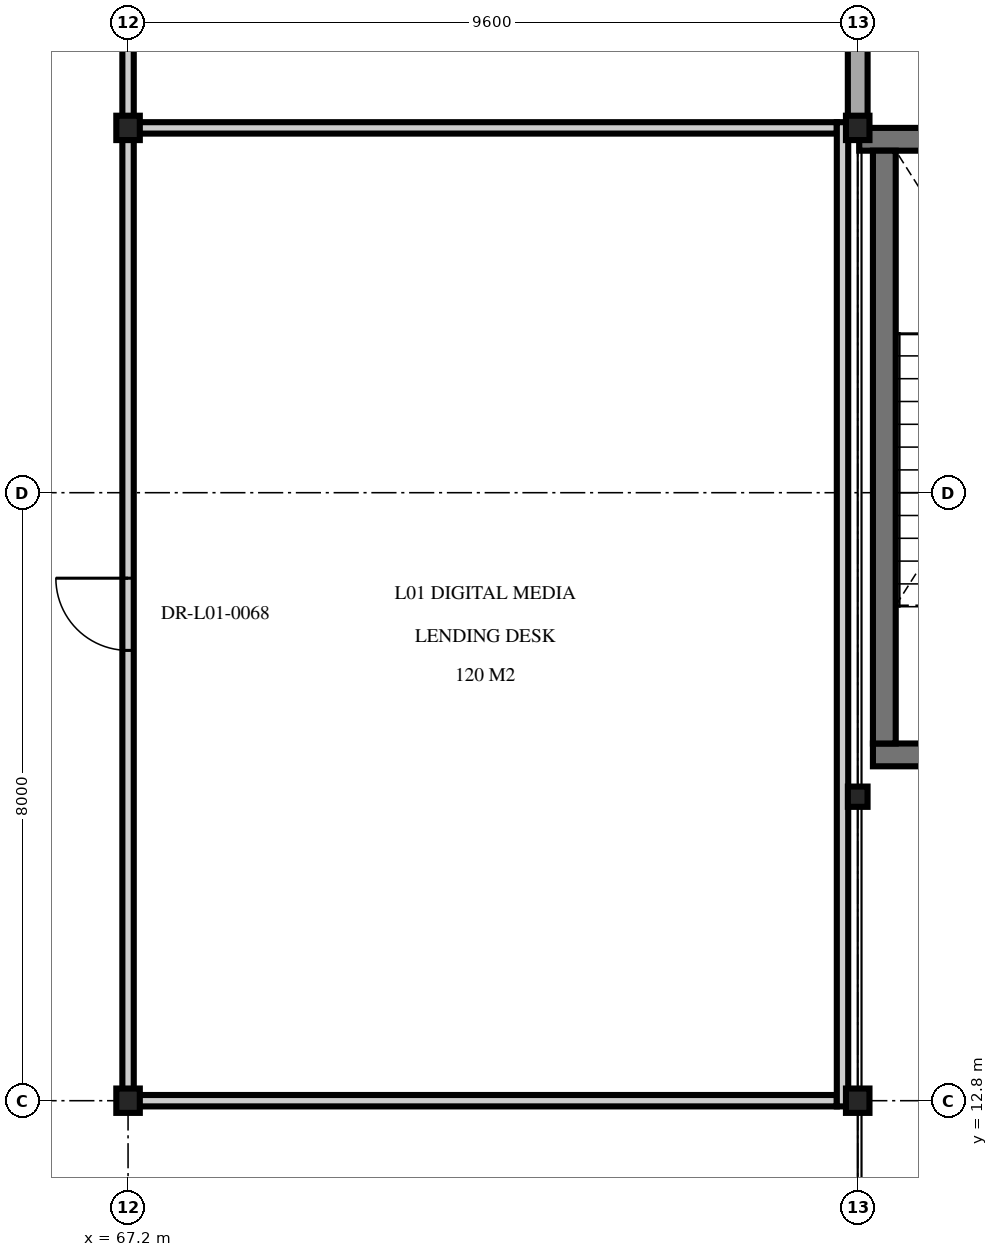
"""IFC4 building model, lengths in metres.
Left out: names, types, materials, properties, quantities, classifications, styles, units other than length and angle.
Written with IfcOpenShell. Run it as: python <this file> out.ifc"""

import sys

from ifc_helpers import new_model, si_unit, direction, frame, frame_2d, origin, origin_2d, place, context, subcontext, project, spatial, rectangle, i_section, extrude, element, fill, save


model = new_model("IFC4")
c1 = context("Model", 3, precision=1e-05, world=origin(), true_north=direction((0.0, 1.0)))
c2 = subcontext(c1, "Body", "Model", "MODEL_VIEW")
j1 = project(units=[si_unit("LENGTHUNIT", "METRE"), si_unit("PLANEANGLEUNIT", "RADIAN")], contexts=[c1])
p1 = place(None, origin())
s1 = spatial("IfcSite", under=j1, at=p1, CompositionType="ELEMENT")
p2 = place(p1, origin())
s2 = spatial("IfcBuilding", under=s1, at=p2, CompositionType="ELEMENT")
p3 = place(p2, frame((0.0, 0.0, 5.1)))
s3 = spatial("IfcBuildingStorey", under=s2, at=p3, CompositionType="ELEMENT", Elevation=5.1)
for number, where, z_axis, x_axis in (
    (1, (67.2, 12.8, 0.0), (0.0, 0.0, 1.0), (1.0, 0.0, 0.0)),
    (2, (67.2, 25.6, 0.0), (0.0, 0.0, 1.0), (1.0, 0.0, 0.0)),
    (3, (76.8, 12.8, 0.0), (0.0, 0.0, 1.0), (1.0, 0.0, 0.0)),
    (4, (76.8, 25.6, 0.0), (0.0, 0.0, 1.0), (1.0, 0.0, 0.0)),
):
    element("IfcColumn", number, at=place(p3, frame(where, z_axis=z_axis, x_axis=x_axis)), inside=s3, PredefinedType="COLUMN", context=c2, shape_type="SweptSolid", body=[
        extrude(i_section(OverallWidth=0.309, OverallDepth=0.321, WebThickness=0.014, FlangeThickness=0.022, at=origin_2d()), origin(), (0.0, 0.0, 1.0), 4.5),
    ])
p4 = place(p3, frame((76.8, 16.8, 0.0), z_axis=(0.0, 0.0, 1.0), x_axis=(1.0, 0.0, 0.0)))
e5 = element("IfcColumn", 5, at=p4, inside=s3, PredefinedType="COLUMN", context=c2, shape_type="SweptSolid", body=[
    extrude(i_section(OverallWidth=0.259, OverallDepth=0.267, WebThickness=0.013, FlangeThickness=0.021, at=origin_2d()), origin(), (0.0, 0.0, 1.0), 4.5),
])
p5 = place(p3, frame((81.4, 17.35, 0.0), z_axis=(0.0, 0.0, 1.0), x_axis=(-1.0, 0.0, 0.0)))
e6 = element("IfcWall", 6, at=p5, inside=s3, PredefinedType="SHEAR", context=c2, shape_type="SweptSolid", body=[
    extrude(rectangle(XDim=4.4, YDim=0.3, at=frame_2d((2.2, 0.0))), origin(), (0.0, 0.0, 1.0), 4.29),
])
p6 = place(p5, frame((1.65, 0.0, 0.0)))
e7 = element("IfcOpeningElement", 7, at=p6, cuts=e6, PredefinedType="OPENING", context=c2, shape_type="SweptSolid", body=[
    extrude(rectangle(XDim=1.1, YDim=2.2, at=frame_2d((0.55, 1.1))), frame((0.0, 0.16, 0.0), z_axis=(0.0, -1.0, 0.0), x_axis=(1.0, 0.0, 0.0)), (0.0, 0.0, 1.0), 0.32),
])
p7 = place(p3, frame((76.82, 25.45, 0.0), z_axis=(0.0, 0.0, 1.0), x_axis=(1.0, 0.0, 0.0)))
e8 = element("IfcWall", 8, at=p7, inside=s3, PredefinedType="SHEAR", context=c2, shape_type="SweptSolid", body=[
    extrude(rectangle(XDim=4.76, YDim=0.3, at=frame_2d((2.38, 0.0))), origin(), (0.0, 0.0, 1.0), 4.29),
])
p8 = place(p3, frame((77.15, 17.5, 0.0), z_axis=(0.0, 0.0, 1.0), x_axis=(0.0, 1.0, 0.0)))
e9 = element("IfcWall", 9, at=p8, inside=s3, PredefinedType="SHEAR", context=c2, shape_type="SweptSolid", body=[
    extrude(rectangle(XDim=7.8, YDim=0.3, at=frame_2d((3.9, 0.0))), origin(), (0.0, 0.0, 1.0), 4.29),
])
p9 = place(p3, frame((76.8, 36.885, 0.0), z_axis=(0.0, 0.0, 1.0), x_axis=(0.0, -1.0, 0.0)))
e10 = element("IfcWall", 10, at=p9, inside=s3, PredefinedType="SOLIDWALL", context=c2, shape_type="SweptSolid", body=[
    extrude(rectangle(XDim=11.37, YDim=0.26, at=frame_2d((5.685, 0.0))), origin(), (0.0, 0.0, 1.0), 3.765),
])
for number, where, z_axis, x_axis in (
    (11, (67.275, 12.8, 0.0), (0.0, 0.0, 1.0), (1.0, 0.0, 0.0)),
    (12, (67.275, 25.6, 0.0), (0.0, 0.0, 1.0), (1.0, 0.0, 0.0)),
):
    element("IfcWall", number, at=place(p3, frame(where, z_axis=z_axis, x_axis=x_axis)), inside=s3, PredefinedType="PARTITIONING", context=c2, shape_type="SweptSolid", body=[
        extrude(rectangle(XDim=9.25, YDim=0.15, at=frame_2d((4.625, 0.0))), origin(), (0.0, 0.0, 1.0), 3.765),
    ])
p10 = place(p3, frame((67.2, 12.725, 0.0), z_axis=(0.0, 0.0, 1.0), x_axis=(0.0, 1.0, 0.0)))
e13 = element("IfcWall", 13, at=p10, inside=s3, PredefinedType="PARTITIONING", context=c2, shape_type="SweptSolid", body=[
    extrude(rectangle(XDim=12.95, YDim=0.15, at=frame_2d((6.475, 0.0))), origin(), (0.0, 0.0, 1.0), 3.765),
])
p11 = place(p10, frame((6.0, 0.0, 0.0)))
e14 = element("IfcOpeningElement", 14, at=p11, cuts=e13, PredefinedType="OPENING", context=c2, shape_type="SweptSolid", body=[
    extrude(rectangle(XDim=0.95, YDim=2.15, at=frame_2d((0.475, 1.075))), frame((0.0, 0.085, 0.0), z_axis=(0.0, -1.0, 0.0), x_axis=(1.0, 0.0, 0.0)), (0.0, 0.0, 1.0), 0.17),
])
p12 = place(p3, frame((76.6, 12.725, 0.0), z_axis=(0.0, 0.0, 1.0), x_axis=(0.0, 1.0, 0.0)))
e15 = element("IfcWall", 15, at=p12, inside=s3, PredefinedType="PARTITIONING", context=c2, shape_type="SweptSolid", body=[
    extrude(rectangle(XDim=12.95, YDim=0.15, at=frame_2d((6.475, 0.0))), origin(), (0.0, 0.0, 1.0), 3.765),
])
p13 = place(p3, frame((67.2, 25.6, 0.0), z_axis=(0.0, 0.0, 1.0), x_axis=(0.0, 1.0, 0.0)))
e16 = element("IfcWall", 16, at=p13, inside=s3, PredefinedType="PARTITIONING", context=c2, shape_type="SweptSolid", body=[
    extrude(rectangle(XDim=11.16, YDim=0.15, at=frame_2d((5.58, 0.0))), origin(), (0.0, 0.0, 1.0), 3.765),
])
p14 = place(p13, frame((5.105, 0.0, 0.0)))
e17 = element("IfcOpeningElement", 17, at=p14, cuts=e16, PredefinedType="OPENING", context=c2, shape_type="SweptSolid", body=[
    extrude(rectangle(XDim=0.95, YDim=2.15, at=frame_2d((0.475, 1.075))), frame((0.0, 0.085, 0.0), z_axis=(0.0, -1.0, 0.0), x_axis=(1.0, 0.0, 0.0)), (0.0, 0.0, 1.0), 0.17),
])
p15 = place(p11, origin())
e18 = element("IfcDoor", 18, at=p15, inside=s3, OperationType="SINGLE_SWING_RIGHT", PredefinedType="DOOR", context=c2, shape_type="SweptSolid", body=[
    extrude(rectangle(XDim=0.95, YDim=2.15, at=frame_2d((0.475, 1.075))), frame((0.0, 0.025, 0.0), z_axis=(0.0, -1.0, 0.0), x_axis=(1.0, 0.0, 0.0)), (0.0, 0.0, 1.0), 0.05),
])
fill(e14, e18)
save(model, sys.argv[1])
